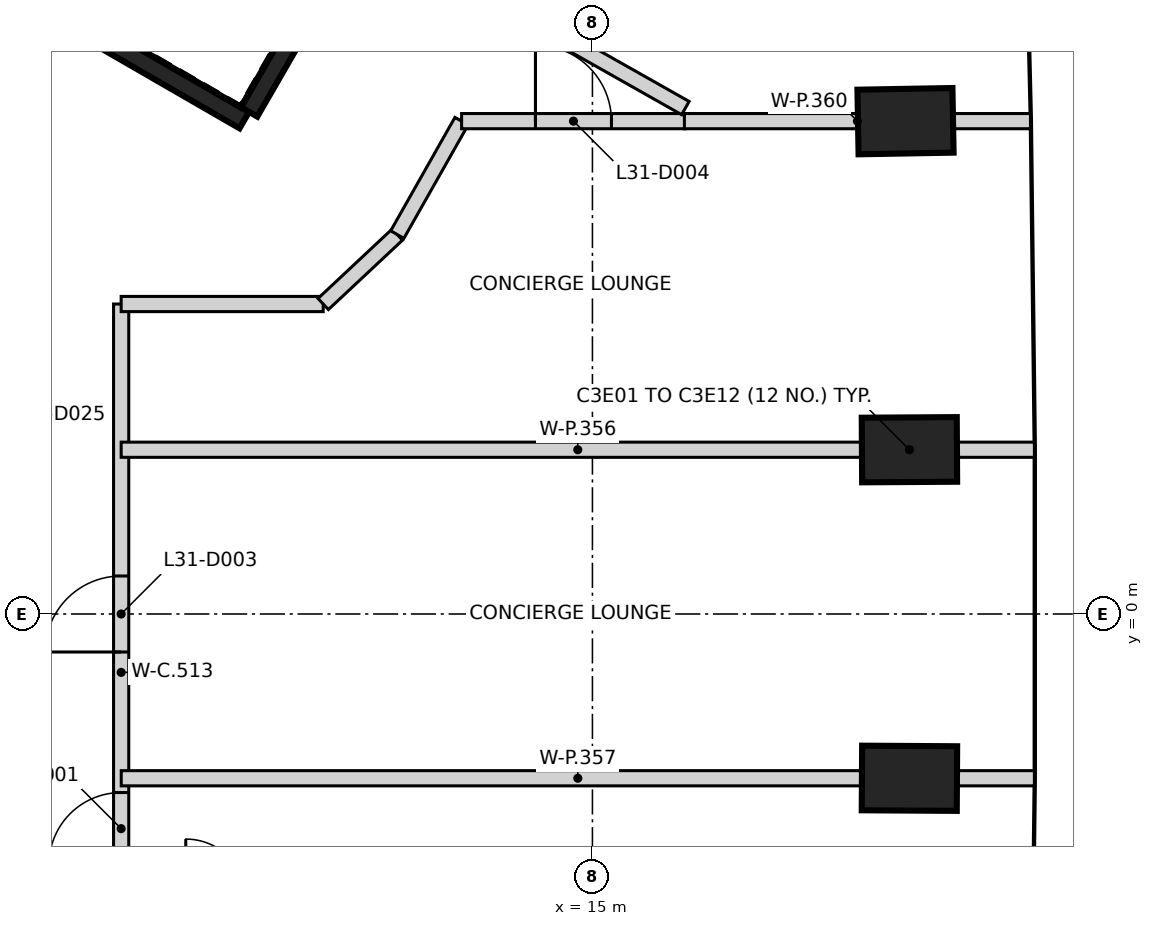
"""IFC4 building model, lengths in metres.
Left out: names, types, materials, properties, quantities, classifications, styles, units other than length and angle.
Written with IfcOpenShell. Run it as: python <this file> out.ifc"""

import sys

from ifc_helpers import new_model, si_unit, direction, frame, frame_2d, origin, origin_2d, place, context, subcontext, project, spatial, rectangle, extrude, element, fill, save


model = new_model("IFC4")
c1 = context("Model", 3, precision=1e-05, world=origin(), true_north=direction((0.0, 1.0)))
c2 = subcontext(c1, "Body", "Model", "MODEL_VIEW")
j1 = project(units=[si_unit("LENGTHUNIT", "METRE"), si_unit("PLANEANGLEUNIT", "RADIAN")], contexts=[c1])
p1 = place(None, origin())
s1 = spatial("IfcSite", under=j1, at=p1, CompositionType="ELEMENT")
p2 = place(p1, origin())
s2 = spatial("IfcBuilding", under=s1, at=p2, CompositionType="ELEMENT")
p3 = place(p2, frame((0.0, 0.0, 128.8)))
s3 = spatial("IfcBuildingStorey", under=s2, at=p3, CompositionType="ELEMENT", Elevation=128.8)
for number, where, z_axis, x_axis in (
    (1, (19.171, -2.161, -0.4), (0.0, 0.0, 1.0), (-1.0, 0.006, 0.0)),
    (2, (19.171, 2.161, -0.4), (0.0, 0.0, 1.0), (1.0, 0.006, 0.0)),
    (3, (19.119, 6.484, -0.4), (0.0, 0.0, 1.0), (1.0, 0.018, 0.0)),
):
    element("IfcColumn", number, at=place(p3, frame(where, z_axis=z_axis, x_axis=x_axis)), inside=s3, PredefinedType="COLUMN", context=c2, shape_type="SweptSolid", body=[
        extrude(rectangle(XDim=1.25, YDim=0.85, at=origin_2d()), origin(), (0.0, 0.0, 1.0), 3.6),
    ])
p4 = place(p3, frame((10.42, 6.498, 0.0), z_axis=(0.0, 0.0, 1.0), x_axis=(-0.866021906294, 0.500006057782, 0.0)))
e4 = element("IfcWall", 4, at=p4, inside=s3, PredefinedType="SHEAR", context=c2, shape_type="SweptSolid", body=[
    extrude(rectangle(XDim=11.55, YDim=0.25, at=frame_2d((5.775, 0.0))), origin(), (0.0, 0.0, 1.0), 3.2),
])
p5 = place(p4, frame((10.025, 0.0, 0.0)))
e5 = element("IfcOpeningElement", 5, at=p5, cuts=e4, PredefinedType="OPENING", context=c2, shape_type="SweptSolid", body=[
    extrude(rectangle(XDim=1.2, YDim=2.1, at=frame_2d((0.6, 1.05))), frame((0.0, 0.135, 0.0), z_axis=(0.0, -1.0, 0.0), x_axis=(1.0, 0.0, 0.0)), (0.0, 0.0, 1.0), 0.27),
])
p6 = place(p4, frame((8.725, 0.0, 0.0)))
e6 = element("IfcOpeningElement", 6, at=p6, cuts=e4, PredefinedType="OPENING", context=c2, shape_type="SweptSolid", body=[
    extrude(rectangle(XDim=1.2, YDim=2.1, at=frame_2d((0.6, 1.05))), frame((0.0, 0.135, 0.0), z_axis=(0.0, -1.0, 0.0), x_axis=(1.0, 0.0, 0.0)), (0.0, 0.0, 1.0), 0.27),
])
p7 = place(p3, frame((13.238, 11.378, 0.0), z_axis=(0.0, 0.0, 1.0), x_axis=(-0.500008851346, -0.866020293397, 0.0)))
e7 = element("IfcWall", 7, at=p7, inside=s3, PredefinedType="SHEAR", context=c2, shape_type="SweptSolid", body=[
    extrude(rectangle(XDim=5.51, YDim=0.25, at=frame_2d((2.755, 0.0))), origin(), (0.0, 0.0, 1.0), 3.2),
])
p8 = place(p3, frame((8.8, -5.614, 0.0), z_axis=(0.0, 0.0, 1.0), x_axis=(0.0, 1.0, 0.0)))
e8 = element("IfcWall", 8, at=p8, inside=s3, PredefinedType="PARTITIONING", context=c2, shape_type="SweptSolid", body=[
    extrude(rectangle(XDim=9.692, YDim=0.2, at=frame_2d((4.846, 0.0))), origin(), (0.0, 0.0, 1.0), 3.2),
])
p9 = place(p8, frame((2.315, 0.0, 0.0)))
e9 = element("IfcOpeningElement", 9, at=p9, cuts=e8, PredefinedType="OPENING", context=c2, shape_type="SweptSolid", body=[
    extrude(rectangle(XDim=0.95, YDim=2.1, at=frame_2d((0.475, 1.05))), frame((0.0, 0.11, 0.0), z_axis=(0.0, -1.0, 0.0), x_axis=(1.0, 0.0, 0.0)), (0.0, 0.0, 1.0), 0.22),
])
p10 = place(p8, frame((5.114, 0.0, 0.0)))
e10 = element("IfcOpeningElement", 10, at=p10, cuts=e8, PredefinedType="OPENING", context=c2, shape_type="SweptSolid", body=[
    extrude(rectangle(XDim=1.0, YDim=2.1, at=frame_2d((0.5, 1.05))), frame((0.0, 0.11, 0.0), z_axis=(0.0, -1.0, 0.0), x_axis=(1.0, 0.0, 0.0)), (0.0, 0.0, 1.0), 0.22),
])
p11 = place(p3, frame((8.8, 4.078, 0.0), z_axis=(0.0, 0.0, 1.0), x_axis=(1.0, 0.0, 0.0)))
e11 = element("IfcWall", 11, at=p11, inside=s3, PredefinedType="PARTITIONING", context=c2, shape_type="SweptSolid", body=[
    extrude(rectangle(XDim=2.658, YDim=0.2, at=frame_2d((1.329, 0.0))), origin(), (0.0, 0.0, 1.0), 3.2),
])
p12 = place(p3, frame((11.458, 4.078, 0.0), z_axis=(0.0, 0.0, 1.0), x_axis=(0.729936032318, 0.683515463412, 0.0)))
e12 = element("IfcWall", 12, at=p12, inside=s3, PredefinedType="PARTITIONING", context=c2, shape_type="SweptSolid", body=[
    extrude(rectangle(XDim=1.336, YDim=0.2, at=frame_2d((0.668, 0.0))), origin(), (0.0, 0.0, 1.0), 3.2),
])
p13 = place(p3, frame((12.433, 4.992, 0.0), z_axis=(0.0, 0.0, 1.0), x_axis=(0.492807777065, 0.870138204462, 0.0)))
e13 = element("IfcWall", 13, at=p13, inside=s3, PredefinedType="PARTITIONING", context=c2, shape_type="SweptSolid", body=[
    extrude(rectangle(XDim=1.715, YDim=0.2, at=frame_2d((0.857, 0.0))), origin(), (0.0, 0.0, 1.0), 3.2),
])
p14 = place(p3, frame((13.279, 6.484, 0.0), z_axis=(0.0, 0.0, 1.0), x_axis=(1.0, 0.0, 0.0)))
e14 = element("IfcWall", 14, at=p14, inside=s3, PredefinedType="PARTITIONING", context=c2, shape_type="SweptSolid", body=[
    extrude(rectangle(XDim=2.943, YDim=0.2, at=frame_2d((1.471, 0.0))), origin(), (0.0, 0.0, 1.0), 3.2),
])
p15 = place(p14, frame((0.971, 0.0, 0.0)))
e15 = element("IfcOpeningElement", 15, at=p15, cuts=e14, PredefinedType="OPENING", context=c2, shape_type="SweptSolid", body=[
    extrude(rectangle(XDim=1.0, YDim=2.1, at=frame_2d((0.5, 1.05))), frame((0.0, 0.11, 0.0), z_axis=(0.0, -1.0, 0.0), x_axis=(1.0, 0.0, 0.0)), (0.0, 0.0, 1.0), 0.22),
])
p16 = place(p3, frame((14.066, 7.876, 0.0), z_axis=(0.0, 0.0, 1.0), x_axis=(0.870423351516, -0.492303960105, 0.0)))
e16 = element("IfcWall", 16, at=p16, inside=s3, PredefinedType="PARTITIONING", context=c2, shape_type="SweptSolid", body=[
    extrude(rectangle(XDim=2.478, YDim=0.2, at=frame_2d((1.239, 0.0))), origin(), (0.0, 0.0, 1.0), 3.2),
])
p17 = place(p3, frame((8.8, 2.161, 0.0), z_axis=(0.0, 0.0, 1.0), x_axis=(1.0, 0.0, 0.0)))
e17 = element("IfcWall", 17, at=p17, inside=s3, PredefinedType="PARTITIONING", context=c2, shape_type="SweptSolid", body=[
    extrude(rectangle(XDim=12.015, YDim=0.2, at=frame_2d((6.007, 0.0))), origin(), (0.0, 0.0, 1.0), 3.2),
])
p18 = place(p3, frame((8.801, -2.161, 0.0), z_axis=(0.0, 0.0, 1.0), x_axis=(1.0, 0.0, 0.0)))
e18 = element("IfcWall", 18, at=p18, inside=s3, PredefinedType="PARTITIONING", context=c2, shape_type="SweptSolid", body=[
    extrude(rectangle(XDim=12.014, YDim=0.2, at=frame_2d((6.007, 0.0))), origin(), (0.0, 0.0, 1.0), 3.2),
])
p19 = place(p3, frame((16.21, 6.484, 0.0), z_axis=(0.0, 0.0, 1.0), x_axis=(1.0, 0.0, 0.0)))
e19 = element("IfcWall", 19, at=p19, inside=s3, PredefinedType="PARTITIONING", context=c2, shape_type="SweptSolid", body=[
    extrude(rectangle(XDim=4.553, YDim=0.2, at=frame_2d((2.277, 0.0))), origin(), (0.0, 0.0, 1.0), 3.2),
])
p20 = place(p9, frame((0.95, 0.0, 0.0), z_axis=(0.0, 0.0, 1.0), x_axis=(-1.0, 0.0, 0.0)))
e20 = element("IfcDoor", 20, at=p20, inside=s3, OperationType="SINGLE_SWING_LEFT", PredefinedType="DOOR", context=c2, shape_type="SweptSolid", body=[
    extrude(rectangle(XDim=0.95, YDim=2.1, at=frame_2d((0.475, 1.05))), frame((0.0, 0.025, 0.0), z_axis=(0.0, -1.0, 0.0), x_axis=(1.0, 0.0, 0.0)), (0.0, 0.0, 1.0), 0.05),
])
fill(e9, e20)
p21 = place(p10, frame((1.0, 0.0, 0.0), z_axis=(0.0, 0.0, 1.0), x_axis=(-1.0, 0.0, 0.0)))
e21 = element("IfcDoor", 21, at=p21, inside=s3, OperationType="SINGLE_SWING_LEFT", PredefinedType="DOOR", context=c2, shape_type="SweptSolid", body=[
    extrude(rectangle(XDim=1.0, YDim=2.1, at=frame_2d((0.5, 1.05))), frame((0.0, 0.025, 0.0), z_axis=(0.0, -1.0, 0.0), x_axis=(1.0, 0.0, 0.0)), (0.0, 0.0, 1.0), 0.05),
])
fill(e10, e21)
p22 = place(p15, frame((1.0, 0.0, 0.0), z_axis=(0.0, 0.0, 1.0), x_axis=(-1.0, 0.0, 0.0)))
e22 = element("IfcDoor", 22, at=p22, inside=s3, OperationType="SINGLE_SWING_LEFT", PredefinedType="DOOR", context=c2, shape_type="SweptSolid", body=[
    extrude(rectangle(XDim=1.0, YDim=2.1, at=frame_2d((0.5, 1.05))), frame((0.0, 0.025, 0.0), z_axis=(0.0, -1.0, 0.0), x_axis=(1.0, 0.0, 0.0)), (0.0, 0.0, 1.0), 0.05),
])
fill(e15, e22)
save(model, sys.argv[1])
